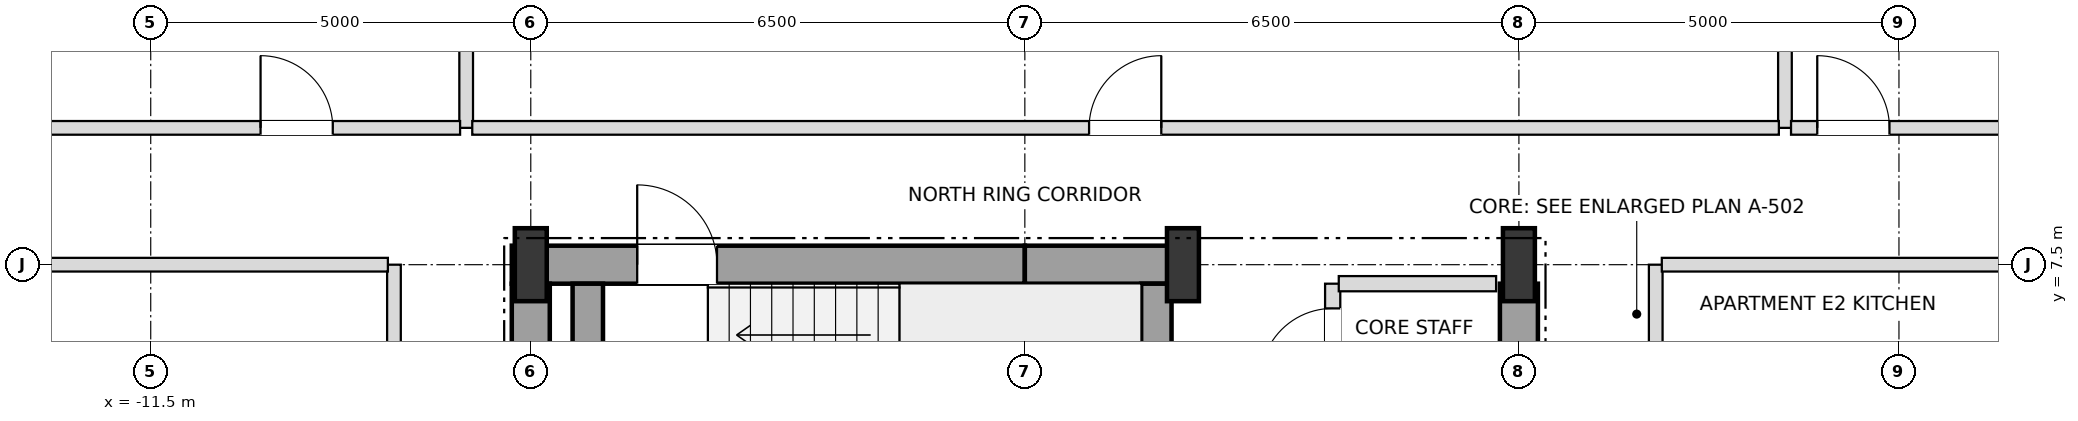
"""IFC4 building model, lengths in metres.
Left out: names, types, materials, properties, quantities, classifications, styles, units other than length and angle.
Written with IfcOpenShell. Run it as: python <this file> out.ifc"""

import sys

from ifc_helpers import new_model, si_unit, direction, frame, frame_2d, origin, origin_2d, place, context, subcontext, project, spatial, rectangle, i_section, extrude, element, fill, save


model = new_model("IFC4")
c1 = context("Model", 3, precision=1e-05, world=origin(), true_north=direction((0.0, 1.0)))
c2 = subcontext(c1, "Body", "Model", "MODEL_VIEW")
j1 = project(units=[si_unit("LENGTHUNIT", "METRE"), si_unit("PLANEANGLEUNIT", "RADIAN")], contexts=[c1])
p1 = place(None, origin())
s1 = spatial("IfcSite", under=j1, at=p1, CompositionType="ELEMENT")
p2 = place(p1, origin())
s2 = spatial("IfcBuilding", under=s1, at=p2, CompositionType="ELEMENT")
p3 = place(p2, frame((0.0, 0.0, 75.6)))
s3 = spatial("IfcBuildingStorey", under=s2, at=p3, CompositionType="ELEMENT", Elevation=75.6)
for number, where, z_axis, x_axis in (
    (1, (-6.5, 7.5, 0.0), (0.0, 0.0, 1.0), (1.0, 0.0, 0.0)),
    (2, (2.08, 7.5, 0.0), (0.0, 0.0, 1.0), (1.0, 0.0, 0.0)),
    (3, (6.5, 7.5, 0.0), (0.0, 0.0, 1.0), (1.0, 0.0, 0.0)),
):
    element("IfcColumn", number, at=place(p3, frame(where, z_axis=z_axis, x_axis=x_axis)), inside=s3, PredefinedType="COLUMN", context=c2, shape_type="SweptSolid", body=[
        extrude(i_section(OverallWidth=0.42, OverallDepth=0.96, WebThickness=0.022, FlangeThickness=0.034, at=origin_2d()), origin(), (0.0, 0.0, 1.0), 3.6),
    ])
p4 = place(p3, frame((-6.75, 7.5, 0.0), z_axis=(0.0, 0.0, 1.0), x_axis=(1.0, 0.0, 0.0)))
e4 = element("IfcWall", 4, at=p4, inside=s3, PredefinedType="SHEAR", context=c2, shape_type="SweptSolid", body=[
    extrude(rectangle(XDim=6.75, YDim=0.5, at=frame_2d((3.375, 0.0))), origin(), (0.0, 0.0, 1.0), 3.38),
])
p5 = place(p4, frame((1.65, 0.0, 0.0)))
e5 = element("IfcOpeningElement", 5, at=p5, cuts=e4, PredefinedType="OPENING", context=c2, shape_type="SweptSolid", body=[
    extrude(rectangle(XDim=1.05, YDim=2.15, at=frame_2d((0.525, 1.075))), frame((0.0, 0.26, 0.0), z_axis=(0.0, -1.0, 0.0), x_axis=(1.0, 0.0, 0.0)), (0.0, 0.0, 1.0), 0.52),
])
p6 = place(p3, frame((0.0, 7.5, 0.0), z_axis=(0.0, 0.0, 1.0), x_axis=(1.0, 0.0, 0.0)))
e6 = element("IfcWall", 6, at=p6, inside=s3, PredefinedType="SHEAR", context=c2, shape_type="SweptSolid", body=[
    extrude(rectangle(XDim=2.08, YDim=0.5, at=frame_2d((1.04, 0.0))), origin(), (0.0, 0.0, 1.0), 3.38),
])
for number, where, z_axis, x_axis in (
    (7, (-6.5, 3.95, 0.0), (0.0, 0.0, 1.0), (0.0, 1.0, 0.0)),
    (8, (6.5, 3.95, 0.0), (0.0, 0.0, 1.0), (0.0, 1.0, 0.0)),
):
    element("IfcWall", number, at=place(p3, frame(where, z_axis=z_axis, x_axis=x_axis)), inside=s3, PredefinedType="SHEAR", context=c2, shape_type="SweptSolid", body=[
        extrude(rectangle(XDim=3.3, YDim=0.5, at=frame_2d((1.65, 0.0))), origin(), (0.0, 0.0, 1.0), 3.38),
    ])
for number, where, z_axis, x_axis in (
    (9, (1.73, 3.95, 0.0), (0.0, 0.0, 1.0), (0.0, 1.0, 0.0)),
    (10, (-5.75, 3.95, 0.0), (0.0, 0.0, 1.0), (0.0, 1.0, 0.0)),
):
    element("IfcWall", number, at=place(p3, frame(where, z_axis=z_axis, x_axis=x_axis)), inside=s3, PredefinedType="SHEAR", context=c2, shape_type="SweptSolid", body=[
        extrude(rectangle(XDim=3.3, YDim=0.4, at=frame_2d((1.65, 0.0))), origin(), (0.0, 0.0, 1.0), 3.38),
    ])
p7 = place(p3, frame((-8.3, -7.5, 0.0), z_axis=(0.0, 0.0, 1.0), x_axis=(0.0, 1.0, 0.0)))
e11 = element("IfcWall", 11, at=p7, inside=s3, PredefinedType="PARTITIONING", context=c2, shape_type="SweptSolid", body=[
    extrude(rectangle(XDim=15.0, YDim=0.18, at=frame_2d((7.5, 0.0))), origin(), (0.0, 0.0, 1.0), 3.38),
])
p8 = place(p7, frame((3.475, 0.0, 0.0)))
e12 = element("IfcOpeningElement", 12, at=p8, cuts=e11, PredefinedType="OPENING", context=c2, shape_type="SweptSolid", body=[
    extrude(rectangle(XDim=0.95, YDim=2.15, at=frame_2d((0.475, 1.075))), frame((0.0, 0.1, 0.0), z_axis=(0.0, -1.0, 0.0), x_axis=(1.0, 0.0, 0.0)), (0.0, 0.0, 1.0), 0.2),
])
p9 = place(p3, frame((-7.35, 9.3, 0.0), z_axis=(0.0, 0.0, 1.0), x_axis=(0.0, 1.0, 0.0)))
e13 = element("IfcWall", 13, at=p9, inside=s3, PredefinedType="PARTITIONING", context=c2, shape_type="SweptSolid", body=[
    extrude(rectangle(XDim=15.6, YDim=0.18, at=frame_2d((7.8, 0.0))), origin(), (0.0, 0.0, 1.0), 2.816),
])
p10 = place(p3, frame((4.05, 4.2, 0.0), z_axis=(0.0, 0.0, 1.0), x_axis=(0.0, 1.0, 0.0)))
e14 = element("IfcWall", 14, at=p10, inside=s3, PredefinedType="SOLIDWALL", context=c2, shape_type="SweptSolid", body=[
    extrude(rectangle(XDim=3.05, YDim=0.2, at=frame_2d((1.525, 0.0))), origin(), (0.0, 0.0, 1.0), 3.38),
])
p11 = place(p10, frame((0.275, 0.0, 0.0)))
e15 = element("IfcOpeningElement", 15, at=p11, cuts=e14, PredefinedType="OPENING", context=c2, shape_type="SweptSolid", body=[
    extrude(rectangle(XDim=0.95, YDim=2.15, at=frame_2d((0.475, 1.075))), frame((0.0, 0.11, 0.0), z_axis=(0.0, -1.0, 0.0), x_axis=(1.0, 0.0, 0.0)), (0.0, 0.0, 1.0), 0.22),
])
p12 = place(p10, frame((1.775, 0.0, 0.0)))
e16 = element("IfcOpeningElement", 16, at=p12, cuts=e14, PredefinedType="OPENING", context=c2, shape_type="SweptSolid", body=[
    extrude(rectangle(XDim=0.95, YDim=2.15, at=frame_2d((0.475, 1.075))), frame((0.0, 0.11, 0.0), z_axis=(0.0, -1.0, 0.0), x_axis=(1.0, 0.0, 0.0)), (0.0, 0.0, 1.0), 0.22),
])
p13 = place(p3, frame((8.3, -7.5, 0.0), z_axis=(0.0, 0.0, 1.0), x_axis=(0.0, 1.0, 0.0)))
e17 = element("IfcWall", 17, at=p13, inside=s3, PredefinedType="PARTITIONING", context=c2, shape_type="SweptSolid", body=[
    extrude(rectangle(XDim=15.0, YDim=0.18, at=frame_2d((7.5, 0.0))), origin(), (0.0, 0.0, 1.0), 3.38),
])
p14 = place(p13, frame((3.305, 0.0, 0.0)))
e18 = element("IfcOpeningElement", 18, at=p14, cuts=e17, PredefinedType="OPENING", context=c2, shape_type="SweptSolid", body=[
    extrude(rectangle(XDim=0.95, YDim=2.15, at=frame_2d((0.475, 1.075))), frame((0.0, 0.1, 0.0), z_axis=(0.0, -1.0, 0.0), x_axis=(1.0, 0.0, 0.0)), (0.0, 0.0, 1.0), 0.2),
])
p15 = place(p13, frame((10.805, 0.0, 0.0)))
e19 = element("IfcOpeningElement", 19, at=p15, cuts=e17, PredefinedType="OPENING", context=c2, shape_type="SweptSolid", body=[
    extrude(rectangle(XDim=0.95, YDim=2.15, at=frame_2d((0.475, 1.075))), frame((0.0, 0.1, 0.0), z_axis=(0.0, -1.0, 0.0), x_axis=(1.0, 0.0, 0.0)), (0.0, 0.0, 1.0), 0.2),
])
p16 = place(p3, frame((10.0, 9.3, 0.0), z_axis=(0.0, 0.0, 1.0), x_axis=(0.0, 1.0, 0.0)))
e20 = element("IfcWall", 20, at=p16, inside=s3, PredefinedType="PARTITIONING", context=c2, shape_type="SweptSolid", body=[
    extrude(rectangle(XDim=15.6, YDim=0.18, at=frame_2d((7.8, 0.0))), origin(), (0.0, 0.0, 1.0), 2.816),
])
p17 = place(p3, frame((4.13, 7.25, 0.0), z_axis=(0.0, 0.0, 1.0), x_axis=(1.0, 0.0, 0.0)))
e21 = element("IfcWall", 21, at=p17, inside=s3, PredefinedType="SOLIDWALL", context=c2, shape_type="SweptSolid", body=[
    extrude(rectangle(XDim=2.07, YDim=0.2, at=frame_2d((1.035, 0.0))), origin(), (0.0, 0.0, 1.0), 3.38),
])
for number, where, z_axis, x_axis in (
    (22, (-16.02, 7.5, 0.0), (0.0, 0.0, 1.0), (1.0, 0.0, 0.0)),
    (23, (8.38, 7.5, 0.0), (0.0, 0.0, 1.0), (1.0, 0.0, 0.0)),
):
    element("IfcWall", number, at=place(p3, frame(where, z_axis=z_axis, x_axis=x_axis)), inside=s3, PredefinedType="PARTITIONING", context=c2, shape_type="SweptSolid", body=[
        extrude(rectangle(XDim=7.64, YDim=0.18, at=frame_2d((3.82, 0.0))), origin(), (0.0, 0.0, 1.0), 2.816),
    ])
p18 = place(p3, frame((-18.4, 9.3, 0.0), z_axis=(0.0, 0.0, 1.0), x_axis=(1.0, 0.0, 0.0)))
e24 = element("IfcWall", 24, at=p18, inside=s3, PredefinedType="PARTITIONING", context=c2, shape_type="SweptSolid", body=[
    extrude(rectangle(XDim=10.97, YDim=0.18, at=frame_2d((5.485, 0.0))), origin(), (0.0, 0.0, 1.0), 2.816),
])
p19 = place(p18, frame((8.345, 0.0, 0.0)))
e25 = element("IfcOpeningElement", 25, at=p19, cuts=e24, PredefinedType="OPENING", context=c2, shape_type="SweptSolid", body=[
    extrude(rectangle(XDim=0.95, YDim=2.15, at=frame_2d((0.475, 1.075))), frame((0.0, 0.1, 0.0), z_axis=(0.0, -1.0, 0.0), x_axis=(1.0, 0.0, 0.0)), (0.0, 0.0, 1.0), 0.2),
])
p20 = place(p3, frame((-7.27, 9.3, 0.0), z_axis=(0.0, 0.0, 1.0), x_axis=(1.0, 0.0, 0.0)))
e26 = element("IfcWall", 26, at=p20, inside=s3, PredefinedType="PARTITIONING", context=c2, shape_type="SweptSolid", body=[
    extrude(rectangle(XDim=17.19, YDim=0.18, at=frame_2d((8.595, 0.0))), origin(), (0.0, 0.0, 1.0), 2.816),
])
p21 = place(p20, frame((8.115, 0.0, 0.0)))
e27 = element("IfcOpeningElement", 27, at=p21, cuts=e26, PredefinedType="OPENING", context=c2, shape_type="SweptSolid", body=[
    extrude(rectangle(XDim=0.95, YDim=2.15, at=frame_2d((0.475, 1.075))), frame((0.0, 0.1, 0.0), z_axis=(0.0, -1.0, 0.0), x_axis=(1.0, 0.0, 0.0)), (0.0, 0.0, 1.0), 0.2),
])
p22 = place(p3, frame((10.08, 9.3, 0.0), z_axis=(0.0, 0.0, 1.0), x_axis=(1.0, 0.0, 0.0)))
e28 = element("IfcWall", 28, at=p22, inside=s3, PredefinedType="PARTITIONING", context=c2, shape_type="SweptSolid", body=[
    extrude(rectangle(XDim=8.32, YDim=0.18, at=frame_2d((4.16, 0.0))), origin(), (0.0, 0.0, 1.0), 2.816),
])
p23 = place(p22, frame((0.345, 0.0, 0.0)))
e29 = element("IfcOpeningElement", 29, at=p23, cuts=e28, PredefinedType="OPENING", context=c2, shape_type="SweptSolid", body=[
    extrude(rectangle(XDim=0.95, YDim=2.15, at=frame_2d((0.475, 1.075))), frame((0.0, 0.1, 0.0), z_axis=(0.0, -1.0, 0.0), x_axis=(1.0, 0.0, 0.0)), (0.0, 0.0, 1.0), 0.2),
])
p24 = place(p5, origin())
e30 = element("IfcDoor", 30, at=p24, inside=s3, OperationType="SINGLE_SWING_LEFT", PredefinedType="DOOR", context=c2, shape_type="SweptSolid", body=[
    extrude(rectangle(XDim=1.05, YDim=2.15, at=frame_2d((0.525, 1.075))), frame((0.0, 0.025, 0.0), z_axis=(0.0, -1.0, 0.0), x_axis=(1.0, 0.0, 0.0)), (0.0, 0.0, 1.0), 0.05),
])
fill(e5, e30)
p25 = place(p12, origin())
e31 = element("IfcDoor", 31, at=p25, inside=s3, OperationType="SINGLE_SWING_LEFT", PredefinedType="DOOR", context=c2, shape_type="SweptSolid", body=[
    extrude(rectangle(XDim=0.95, YDim=2.15, at=frame_2d((0.475, 1.075))), frame((0.0, 0.025, 0.0), z_axis=(0.0, -1.0, 0.0), x_axis=(1.0, 0.0, 0.0)), (0.0, 0.0, 1.0), 0.05),
])
fill(e16, e31)
p26 = place(p19, origin())
e32 = element("IfcDoor", 32, at=p26, inside=s3, OperationType="SINGLE_SWING_LEFT", PredefinedType="DOOR", context=c2, shape_type="SweptSolid", body=[
    extrude(rectangle(XDim=0.95, YDim=2.15, at=frame_2d((0.475, 1.075))), frame((0.0, 0.025, 0.0), z_axis=(0.0, -1.0, 0.0), x_axis=(1.0, 0.0, 0.0)), (0.0, 0.0, 1.0), 0.05),
])
fill(e25, e32)
p27 = place(p21, origin())
e33 = element("IfcDoor", 33, at=p27, inside=s3, OperationType="SINGLE_SWING_RIGHT", PredefinedType="DOOR", context=c2, shape_type="SweptSolid", body=[
    extrude(rectangle(XDim=0.95, YDim=2.15, at=frame_2d((0.475, 1.075))), frame((0.0, 0.025, 0.0), z_axis=(0.0, -1.0, 0.0), x_axis=(1.0, 0.0, 0.0)), (0.0, 0.0, 1.0), 0.05),
])
fill(e27, e33)
p28 = place(p23, origin())
e34 = element("IfcDoor", 34, at=p28, inside=s3, OperationType="SINGLE_SWING_LEFT", PredefinedType="DOOR", context=c2, shape_type="SweptSolid", body=[
    extrude(rectangle(XDim=0.95, YDim=2.15, at=frame_2d((0.475, 1.075))), frame((0.0, 0.025, 0.0), z_axis=(0.0, -1.0, 0.0), x_axis=(1.0, 0.0, 0.0)), (0.0, 0.0, 1.0), 0.05),
])
fill(e29, e34)
save(model, sys.argv[1])
